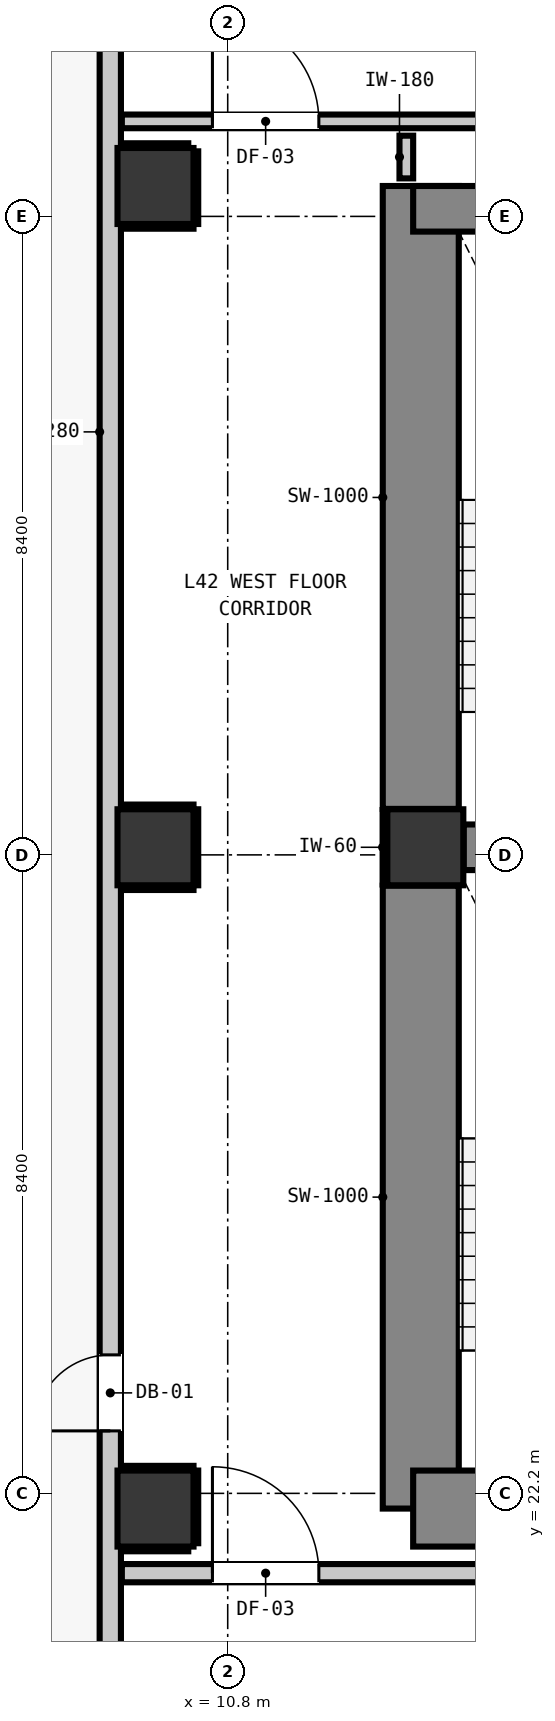
"""IFC4 building model, lengths in metres.
Left out: names, types, materials, properties, quantities, classifications, styles, units other than length and angle.
Written with IfcOpenShell. Run it as: python <this file> out.ifc"""

import sys

from ifc_helpers import new_model, si_unit, direction, frame, frame_2d, origin, origin_2d, place, context, subcontext, project, spatial, rectangle, extrude, element, fill, save


model = new_model("IFC4")
c1 = context("Model", 3, precision=1e-05, world=origin(), true_north=direction((0.0, 1.0)))
c2 = subcontext(c1, "Body", "Model", "MODEL_VIEW")
j1 = project(units=[si_unit("LENGTHUNIT", "METRE"), si_unit("PLANEANGLEUNIT", "RADIAN")], contexts=[c1])
p1 = place(None, origin())
s1 = spatial("IfcSite", under=j1, at=p1, CompositionType="ELEMENT")
p2 = place(p1, origin())
s2 = spatial("IfcBuilding", under=s1, at=p2, CompositionType="ELEMENT")
p3 = place(p2, frame((0.0, 0.0, 145.92)))
s3 = spatial("IfcBuildingStorey", under=s2, at=p3, CompositionType="ELEMENT", Elevation=145.92)
p4 = place(p3, frame((13.4, 30.7, 0.0), z_axis=(0.0, 0.0, 1.0), x_axis=(1.0, 0.0, 0.0)))
e1 = element("IfcColumn", 1, at=p4, inside=s3, PredefinedType="COLUMN", context=c2, shape_type="SweptSolid", body=[
    extrude(rectangle(XDim=1.0, YDim=1.0, at=origin_2d()), origin(), (0.0, 0.0, 1.0), 3.32),
])
p5 = place(p3, frame((13.34, 22.0, 0.0), z_axis=(0.0, 0.0, 1.0), x_axis=(0.0, 1.0, 0.0)))
e2 = element("IfcWall", 2, at=p5, inside=s3, PredefinedType="SHEAR", context=c2, shape_type="SweptSolid", body=[
    extrude(rectangle(XDim=8.195, YDim=1.0, at=frame_2d((4.098, 0.0))), origin(), (0.0, 0.0, 1.0), 3.32),
])
p6 = place(p3, frame((13.34, 31.205, 0.0), z_axis=(0.0, 0.0, 1.0), x_axis=(0.0, 1.0, 0.0)))
e3 = element("IfcWall", 3, at=p6, inside=s3, PredefinedType="SHEAR", context=c2, shape_type="SweptSolid", body=[
    extrude(rectangle(XDim=8.195, YDim=1.0, at=frame_2d((4.097, 0.0))), origin(), (0.0, 0.0, 1.0), 3.32),
])
p7 = place(p3, frame((13.24, 22.0, 0.0), z_axis=(0.0, 0.0, 1.0), x_axis=(1.0, 0.0, 0.0)))
e4 = element("IfcWall", 4, at=p7, inside=s3, PredefinedType="SHEAR", context=c2, shape_type="SweptSolid", body=[
    extrude(rectangle(XDim=4.08, YDim=1.0, at=frame_2d((2.04, 0.0))), origin(), (0.0, 0.0, 1.0), 3.32),
])
p8 = place(p3, frame((13.24, 39.1, 0.0), z_axis=(0.0, 0.0, 1.0), x_axis=(1.0, 0.0, 0.0)))
e5 = element("IfcWall", 5, at=p8, inside=s3, PredefinedType="SHEAR", context=c2, shape_type="SweptSolid", body=[
    extrude(rectangle(XDim=4.08, YDim=0.6, at=frame_2d((2.04, 0.0))), origin(), (0.0, 0.0, 1.0), 3.32),
])
p9 = place(p3, frame((13.905, 30.7, 0.0), z_axis=(0.0, 0.0, 1.0), x_axis=(1.0, 0.0, 0.0)))
e6 = element("IfcWall", 6, at=p9, inside=s3, PredefinedType="SHEAR", context=c2, shape_type="SweptSolid", body=[
    extrude(rectangle(XDim=3.415, YDim=0.6, at=frame_2d((1.708, 0.0))), origin(), (0.0, 0.0, 1.0), 3.32),
])
for number, where, z_axis, x_axis in (
    (7, (9.85, 22.0, -0.2), (0.0, 0.0, 1.0), (1.0, 0.0, 0.0)),
    (8, (9.85, 30.7, -0.2), (0.0, 0.0, 1.0), (1.0, 0.0, 0.0)),
    (9, (9.85, 39.4, -0.2), (0.0, 0.0, 1.0), (1.0, 0.0, 0.0)),
):
    element("IfcColumn", number, at=place(p3, frame(where, z_axis=z_axis, x_axis=x_axis)), inside=s3, PredefinedType="COLUMN", context=c2, shape_type="SweptSolid", body=[
        extrude(rectangle(XDim=1.0, YDim=1.0, at=origin_2d()), origin(), (0.0, 0.0, 1.0), 3.52),
    ])
p10 = place(p3, frame((9.255, 17.555, 0.0), z_axis=(0.0, 0.0, 1.0), x_axis=(0.0, 1.0, 0.0)))
e10 = element("IfcWall", 10, at=p10, inside=s3, PredefinedType="STANDARD", context=c2, shape_type="SweptSolid", body=[
    extrude(rectangle(XDim=32.29, YDim=0.28, at=frame_2d((16.145, 0.0))), origin(), (0.0, 0.0, 1.0), 3.08),
])
p11 = place(p10, frame((5.467, 0.0, 0.0)))
e11 = element("IfcOpeningElement", 11, at=p11, cuts=e10, PredefinedType="OPENING", context=c2, shape_type="SweptSolid", body=[
    extrude(rectangle(XDim=1.0, YDim=2.15, at=frame_2d((0.5, 1.075))), frame((0.0, 0.15, 0.0), z_axis=(0.0, -1.0, 0.0), x_axis=(1.0, 0.0, 0.0)), (0.0, 0.0, 1.0), 0.3),
])
p12 = place(p10, frame((30.753, 0.0, 0.85)))
e12 = element("IfcOpeningElement", 12, at=p12, cuts=e10, PredefinedType="OPENING", context=c2, shape_type="SweptSolid", body=[
    extrude(rectangle(XDim=1.05, YDim=1.65, at=frame_2d((0.525, 0.825))), frame((0.0, 0.15, 0.0), z_axis=(0.0, -1.0, 0.0), x_axis=(1.0, 0.0, 0.0)), (0.0, 0.0, 1.0), 0.3),
])
p13 = place(p3, frame((9.407, 21.15, 0.0), z_axis=(0.0, 0.0, 1.0), x_axis=(1.0, 0.0, 0.0)))
e13 = element("IfcWall", 13, at=p13, inside=s3, PredefinedType="PARTITIONING", context=c2, shape_type="SweptSolid", body=[
    extrude(rectangle(XDim=27.532, YDim=0.24, at=frame_2d((13.766, 0.0))), origin(), (0.0, 0.0, 1.0), 3.08),
])
p14 = place(p13, frame((8.803, 0.0, 0.0)))
e14 = element("IfcOpeningElement", 14, at=p14, cuts=e13, PredefinedType="OPENING", context=c2, shape_type="SweptSolid", body=[
    extrude(rectangle(XDim=1.1, YDim=2.15, at=frame_2d((0.55, 1.075))), frame((0.0, 0.13, 0.0), z_axis=(0.0, -1.0, 0.0), x_axis=(1.0, 0.0, 0.0)), (0.0, 0.0, 1.0), 0.26),
])
p15 = place(p13, frame((1.192, 0.0, 0.0)))
e15 = element("IfcOpeningElement", 15, at=p15, cuts=e13, PredefinedType="OPENING", context=c2, shape_type="SweptSolid", body=[
    extrude(rectangle(XDim=1.4, YDim=2.15, at=frame_2d((0.7, 1.075))), frame((0.0, 0.13, 0.0), z_axis=(0.0, -1.0, 0.0), x_axis=(1.0, 0.0, 0.0)), (0.0, 0.0, 1.0), 0.26),
])
p16 = place(p3, frame((9.407, 40.25, 0.0), z_axis=(0.0, 0.0, 1.0), x_axis=(1.0, 0.0, 0.0)))
e16 = element("IfcWall", 16, at=p16, inside=s3, PredefinedType="PARTITIONING", context=c2, shape_type="SweptSolid", body=[
    extrude(rectangle(XDim=39.386, YDim=0.18, at=frame_2d((19.693, 0.0))), origin(), (0.0, 0.0, 1.0), 3.08),
])
p17 = place(p16, frame((8.028, 0.0, 0.0)))
e17 = element("IfcOpeningElement", 17, at=p17, cuts=e16, PredefinedType="OPENING", context=c2, shape_type="SweptSolid", body=[
    extrude(rectangle(XDim=1.4, YDim=2.15, at=frame_2d((0.7, 1.075))), frame((0.0, 0.1, 0.0), z_axis=(0.0, -1.0, 0.0), x_axis=(1.0, 0.0, 0.0)), (0.0, 0.0, 1.0), 0.2),
])
p18 = place(p16, frame((1.192, 0.0, 0.0)))
e18 = element("IfcOpeningElement", 18, at=p18, cuts=e16, PredefinedType="OPENING", context=c2, shape_type="SweptSolid", body=[
    extrude(rectangle(XDim=1.4, YDim=2.15, at=frame_2d((0.7, 1.075))), frame((0.0, 0.1, 0.0), z_axis=(0.0, -1.0, 0.0), x_axis=(1.0, 0.0, 0.0)), (0.0, 0.0, 1.0), 0.2),
])
p19 = place(p16, frame((28.643, 0.0, 0.0)))
e19 = element("IfcOpeningElement", 19, at=p19, cuts=e16, PredefinedType="OPENING", context=c2, shape_type="SweptSolid", body=[
    extrude(rectangle(XDim=1.4, YDim=2.15, at=frame_2d((0.7, 1.075))), frame((0.0, 0.1, 0.0), z_axis=(0.0, -1.0, 0.0), x_axis=(1.0, 0.0, 0.0)), (0.0, 0.0, 1.0), 0.2),
])
p20 = place(p3, frame((13.15, 39.5, 0.0), z_axis=(0.0, 0.0, 1.0), x_axis=(0.0, 1.0, 0.0)))
e20 = element("IfcWall", 20, at=p20, inside=s3, PredefinedType="PARTITIONING", context=c2, shape_type="SweptSolid", body=[
    extrude(rectangle(XDim=0.562, YDim=0.18, at=frame_2d((0.281, 0.0))), origin(), (0.0, 0.0, 1.0), 2.315),
])
p21 = place(p3, frame((12.868, 30.21, 0.0), z_axis=(0.0, 0.0, 1.0), x_axis=(0.0, 1.0, 0.0)))
e21 = element("IfcWall", 21, at=p21, inside=s3, PredefinedType="PARTITIONING", context=c2, shape_type="SweptSolid", body=[
    extrude(rectangle(XDim=0.98, YDim=0.06, at=frame_2d((0.49, 0.0))), origin(), (0.0, 0.0, 1.0), 1.45),
])
p22 = place(p3, frame((9.41, 21.468, 0.0), z_axis=(0.0, 0.0, 1.0), x_axis=(1.0, 0.0, 0.0)))
e22 = element("IfcWall", 22, at=p22, inside=s3, PredefinedType="PARTITIONING", context=c2, shape_type="SweptSolid", body=[
    extrude(rectangle(XDim=0.871, YDim=0.06, at=frame_2d((0.436, 0.0))), origin(), (0.0, 0.0, 1.0), 1.45),
])
p23 = place(p3, frame((9.41, 22.532, 0.0), z_axis=(0.0, 0.0, 1.0), x_axis=(1.0, 0.0, 0.0)))
e23 = element("IfcWall", 23, at=p23, inside=s3, PredefinedType="PARTITIONING", context=c2, shape_type="SweptSolid", body=[
    extrude(rectangle(XDim=0.94, YDim=0.06, at=frame_2d((0.47, 0.0))), origin(), (0.0, 0.0, 1.0), 1.45),
])
p24 = place(p3, frame((10.382, 21.544, 0.0), z_axis=(0.0, 0.0, 1.0), x_axis=(0.0, 1.0, 0.0)))
e24 = element("IfcWall", 24, at=p24, inside=s3, PredefinedType="PARTITIONING", context=c2, shape_type="SweptSolid", body=[
    extrude(rectangle(XDim=0.956, YDim=0.06, at=frame_2d((0.478, 0.0))), origin(), (0.0, 0.0, 1.0), 1.45),
])
for number, where, z_axis, x_axis in (
    (25, (9.41, 30.168, 0.0), (0.0, 0.0, 1.0), (1.0, 0.0, 0.0)),
    (26, (9.41, 31.232, 0.0), (0.0, 0.0, 1.0), (1.0, 0.0, 0.0)),
):
    element("IfcWall", number, at=place(p3, frame(where, z_axis=z_axis, x_axis=x_axis)), inside=s3, PredefinedType="PARTITIONING", context=c2, shape_type="SweptSolid", body=[
        extrude(rectangle(XDim=0.94, YDim=0.06, at=frame_2d((0.47, 0.0))), origin(), (0.0, 0.0, 1.0), 1.45),
    ])
p25 = place(p3, frame((10.382, 30.2, 0.0), z_axis=(0.0, 0.0, 1.0), x_axis=(0.0, 1.0, 0.0)))
e27 = element("IfcWall", 27, at=p25, inside=s3, PredefinedType="PARTITIONING", context=c2, shape_type="SweptSolid", body=[
    extrude(rectangle(XDim=1.0, YDim=0.06, at=frame_2d((0.5, 0.0))), origin(), (0.0, 0.0, 1.0), 1.45),
])
p26 = place(p3, frame((9.41, 38.868, 0.0), z_axis=(0.0, 0.0, 1.0), x_axis=(1.0, 0.0, 0.0)))
e28 = element("IfcWall", 28, at=p26, inside=s3, PredefinedType="PARTITIONING", context=c2, shape_type="SweptSolid", body=[
    extrude(rectangle(XDim=0.94, YDim=0.06, at=frame_2d((0.47, 0.0))), origin(), (0.0, 0.0, 1.0), 1.45),
])
p27 = place(p3, frame((9.41, 39.932, 0.0), z_axis=(0.0, 0.0, 1.0), x_axis=(1.0, 0.0, 0.0)))
e29 = element("IfcWall", 29, at=p27, inside=s3, PredefinedType="PARTITIONING", context=c2, shape_type="SweptSolid", body=[
    extrude(rectangle(XDim=0.871, YDim=0.06, at=frame_2d((0.436, 0.0))), origin(), (0.0, 0.0, 1.0), 1.45),
])
p28 = place(p3, frame((10.382, 38.9, 0.0), z_axis=(0.0, 0.0, 1.0), x_axis=(0.0, 1.0, 0.0)))
e30 = element("IfcWall", 30, at=p28, inside=s3, PredefinedType="PARTITIONING", context=c2, shape_type="SweptSolid", body=[
    extrude(rectangle(XDim=0.956, YDim=0.06, at=frame_2d((0.478, 0.0))), origin(), (0.0, 0.0, 1.0), 1.45),
])
p29 = place(p11, origin())
e31 = element("IfcDoor", 31, at=p29, inside=s3, OperationType="SINGLE_SWING_LEFT", PredefinedType="DOOR", context=c2, shape_type="SweptSolid", body=[
    extrude(rectangle(XDim=1.0, YDim=2.15, at=frame_2d((0.5, 1.075))), frame((0.0, 0.025, 0.0), z_axis=(0.0, -1.0, 0.0), x_axis=(1.0, 0.0, 0.0)), (0.0, 0.0, 1.0), 0.05),
])
fill(e11, e31)
p30 = place(p15, origin())
e32 = element("IfcDoor", 32, at=p30, inside=s3, OperationType="SINGLE_SWING_LEFT", PredefinedType="DOOR", context=c2, shape_type="SweptSolid", body=[
    extrude(rectangle(XDim=1.4, YDim=2.15, at=frame_2d((0.7, 1.075))), frame((0.0, 0.025, 0.0), z_axis=(0.0, -1.0, 0.0), x_axis=(1.0, 0.0, 0.0)), (0.0, 0.0, 1.0), 0.05),
])
fill(e15, e32)
p31 = place(p18, origin())
e33 = element("IfcDoor", 33, at=p31, inside=s3, OperationType="SINGLE_SWING_LEFT", PredefinedType="DOOR", context=c2, shape_type="SweptSolid", body=[
    extrude(rectangle(XDim=1.4, YDim=2.15, at=frame_2d((0.7, 1.075))), frame((0.0, 0.025, 0.0), z_axis=(0.0, -1.0, 0.0), x_axis=(1.0, 0.0, 0.0)), (0.0, 0.0, 1.0), 0.05),
])
fill(e18, e33)
save(model, sys.argv[1])
